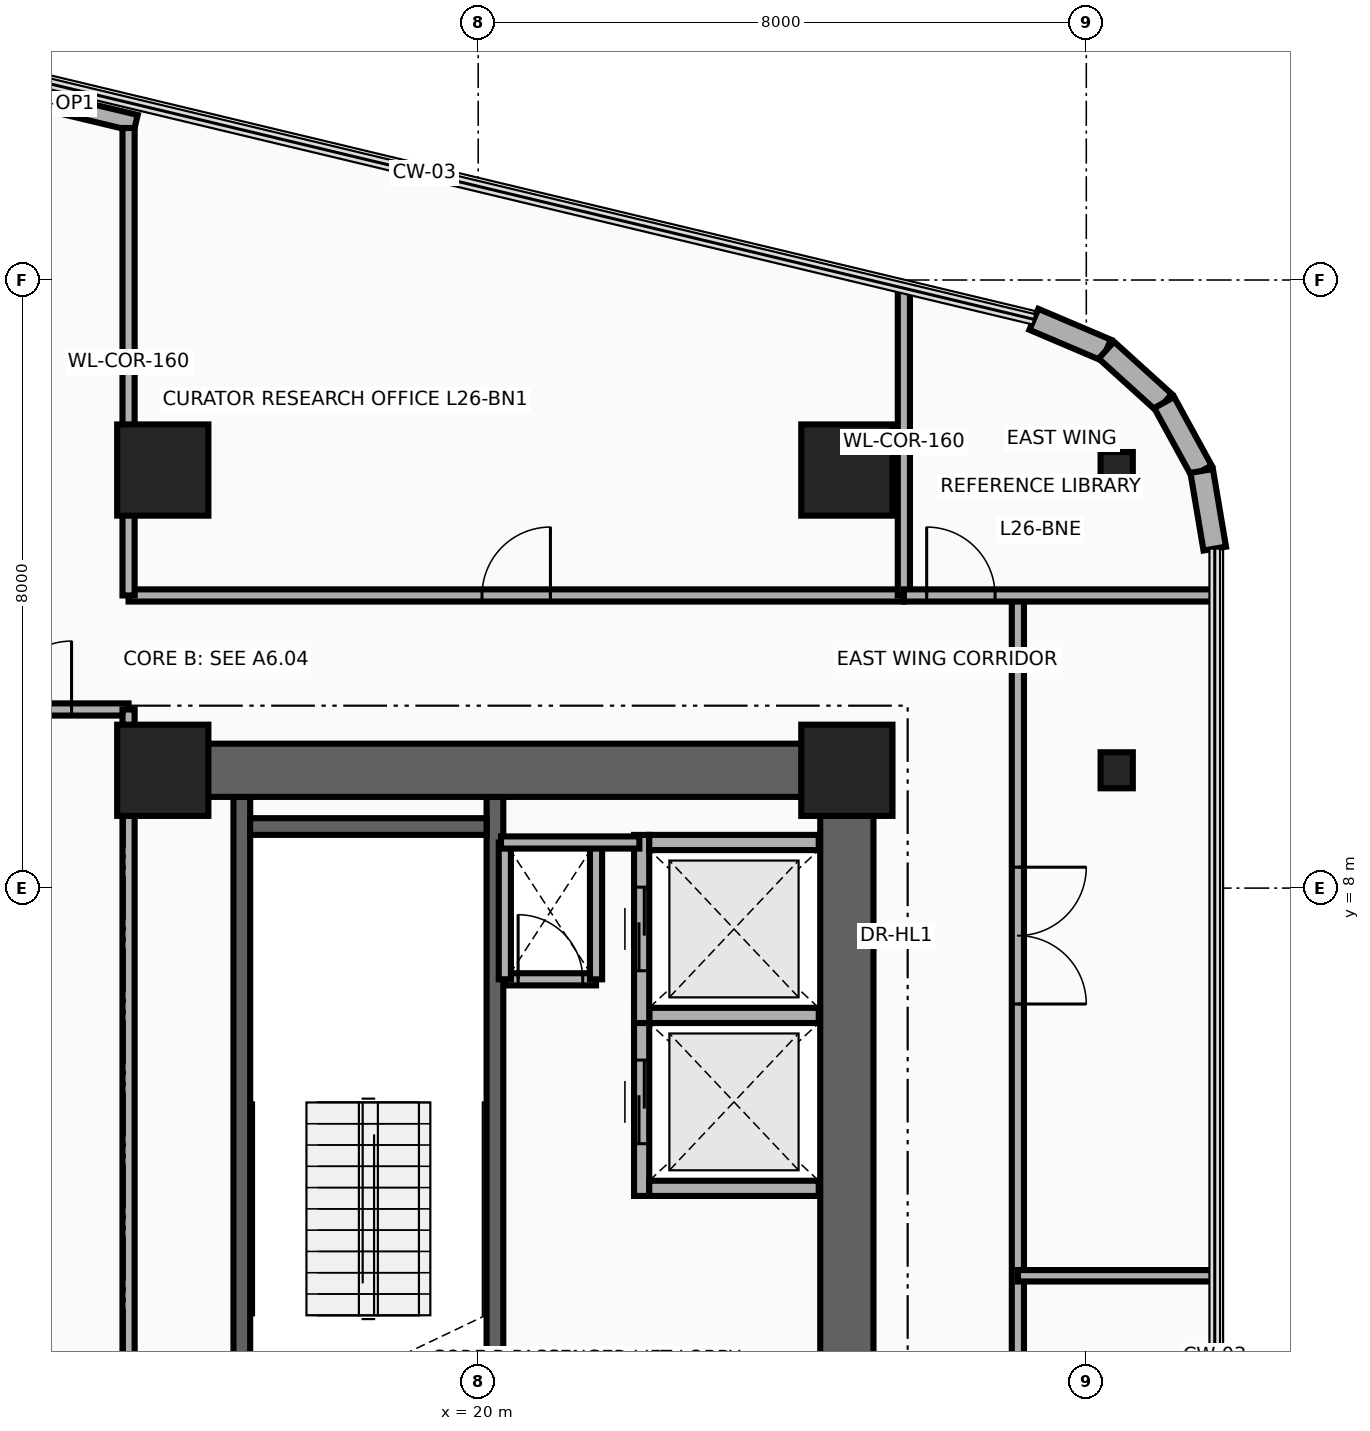
"""IFC4 building model, lengths in metres.
Left out: names, types, materials, properties, quantities, classifications, styles, units other than length and angle.
Written with IfcOpenShell. Run it as: python <this file> out.ifc"""

import sys

from ifc_helpers import new_model, si_unit, direction, frame, frame_2d, origin, origin_2d, place, context, subcontext, project, spatial, rectangle, i_section, extrude, source, transform, mapped, element, fill, save


model = new_model("IFC4")
c1 = context("Model", 3, precision=1e-05, world=origin(), true_north=direction((0.0, 1.0)))
c2 = subcontext(c1, "Body", "Model", "MODEL_VIEW")
j1 = project(units=[si_unit("LENGTHUNIT", "METRE"), si_unit("PLANEANGLEUNIT", "RADIAN")], contexts=[c1])
p1 = place(None, origin())
s1 = spatial("IfcSite", under=j1, at=p1, CompositionType="ELEMENT")
p2 = place(p1, origin())
s2 = spatial("IfcBuilding", under=s1, at=p2, CompositionType="ELEMENT")
p3 = place(p2, frame((0.0, 0.0, 105.7)))
s3 = spatial("IfcBuildingStorey", under=s2, at=p3, CompositionType="ELEMENT", Elevation=105.7)
for number, where, z_axis, x_axis in (
    (1, (16.89, 0.68, 0.0), (0.0, 0.0, 1.0), (0.0, 1.0, 0.0)),
    (2, (20.22, 0.68, 0.0), (0.0, 0.0, 1.0), (0.0, 1.0, 0.0)),
):
    element("IfcWall", number, at=place(p3, frame(where, z_axis=z_axis, x_axis=x_axis)), inside=s3, PredefinedType="SHEAR", context=c2, shape_type="SweptSolid", body=[
        extrude(rectangle(XDim=8.52, YDim=0.22, at=frame_2d((4.26, 0.0))), origin(), (0.0, 0.0, 1.0), 3.46),
    ])
p4 = place(p3, frame((17.0, 8.81, 0.0), z_axis=(0.0, 0.0, 1.0), x_axis=(1.0, 0.0, 0.0)))
e3 = element("IfcWall", 3, at=p4, inside=s3, PredefinedType="SHEAR", context=c2, shape_type="SweptSolid", body=[
    extrude(rectangle(XDim=3.11, YDim=0.22, at=frame_2d((1.555, 0.0))), origin(), (0.0, 0.0, 1.0), 3.46),
])
p5 = place(p3, frame((24.85, 0.95, 0.0), z_axis=(0.0, 0.0, 1.0), x_axis=(0.0, 1.0, 0.0)))
e4 = element("IfcWall", 4, at=p5, inside=s3, PredefinedType="SHEAR", context=c2, shape_type="SweptSolid", body=[
    extrude(rectangle(XDim=8.95, YDim=0.7, at=frame_2d((4.475, 0.0))), origin(), (0.0, 0.0, 1.0), 3.46),
])
p6 = place(p3, frame((15.85, 9.55, 0.0), z_axis=(0.0, 0.0, 1.0), x_axis=(1.0, 0.0, 0.0)))
e5 = element("IfcWall", 5, at=p6, inside=s3, PredefinedType="SHEAR", context=c2, shape_type="SweptSolid", body=[
    extrude(rectangle(XDim=9.0, YDim=0.7, at=frame_2d((4.5, 0.0))), origin(), (0.0, 0.0, 1.0), 3.46),
])
m1 = source(origin(), c2, "Body", "SweptSolid", [
    extrude(rectangle(XDim=1.2, YDim=1.2, at=origin_2d()), origin(), (0.0, 0.0, 1.0), 3.7),
])
for number, where, z_axis, x_axis in (
    (6, (15.85, 9.55, 0.0), (0.0, 0.0, 1.0), (1.0, 0.0, 0.0)),
    (7, (24.85, 9.55, 0.0), (0.0, 0.0, 1.0), (1.0, 0.0, 0.0)),
):
    element("IfcColumn", number, at=place(p3, frame(where, z_axis=z_axis, x_axis=x_axis)), inside=s3, PredefinedType="COLUMN", context=c2, shape_type="MappedRepresentation", body=[
        mapped(m1, transform((0.0, 0.0, 0.0), x_axis=(1.0, 0.0, 0.0), y_axis=(0.0, 1.0, 0.0), z_axis=(0.0, 0.0, 1.0), scale=1.0)),
    ])
m2 = source(origin(), c2, "Body", "SweptSolid", [
    extrude(i_section(OverallWidth=0.424, OverallDepth=0.474, WebThickness=0.048, FlangeThickness=0.077, at=origin_2d()), origin(), (0.0, 0.0, 1.0), 3.7),
])
p7 = place(p3, frame((28.4, 9.55, 0.0), z_axis=(0.0, 0.0, 1.0), x_axis=(1.0, 0.0, 0.0)))
e8 = element("IfcColumn", 8, at=p7, inside=s3, PredefinedType="COLUMN", context=c2, shape_type="MappedRepresentation", body=[
    mapped(m2, transform((0.0, 0.0, 0.0), x_axis=(1.0, 0.0, 0.0), y_axis=(0.0, 1.0, 0.0), z_axis=(0.0, 0.0, 1.0), scale=1.0)),
])
for number, where, z_axis, x_axis in (
    (9, (15.85, 13.5, 0.0), (0.0, 0.0, 1.0), (1.0, 0.0, 0.0)),
    (10, (24.85, 13.5, 0.0), (0.0, 0.0, 1.0), (1.0, 0.0, 0.0)),
):
    element("IfcColumn", number, at=place(p3, frame(where, z_axis=z_axis, x_axis=x_axis)), inside=s3, PredefinedType="COLUMN", context=c2, shape_type="MappedRepresentation", body=[
        mapped(m1, transform((0.0, 0.0, 0.0), x_axis=(1.0, 0.0, 0.0), y_axis=(0.0, 1.0, 0.0), z_axis=(0.0, 0.0, 1.0), scale=1.0)),
    ])
p8 = place(p3, frame((28.4, 13.5, 0.0), z_axis=(0.0, 0.0, 1.0), x_axis=(1.0, 0.0, 0.0)))
e11 = element("IfcColumn", 11, at=p8, inside=s3, PredefinedType="COLUMN", context=c2, shape_type="MappedRepresentation", body=[
    mapped(m2, transform((0.0, 0.0, 0.0), x_axis=(1.0, 0.0, 0.0), y_axis=(0.0, 1.0, 0.0), z_axis=(0.0, 0.0, 1.0), scale=1.0)),
])
p9 = place(p3, frame((13.355, 18.576, 0.0), z_axis=(0.0, 0.0, 1.0), x_axis=(0.97252211384, -0.232810519721, 0.0)))
e12 = element("IfcWall", 12, at=p9, inside=s3, PredefinedType="SOLIDWALL", context=c2, shape_type="SweptSolid", body=[
    extrude(rectangle(XDim=2.2, YDim=0.22, at=frame_2d((1.1, 0.0))), origin(), (0.0, 0.0, 1.0), 3.46),
])
p10 = place(p9, frame((0.65, 0.0, 0.95)))
e13 = element("IfcOpeningElement", 13, at=p10, cuts=e12, PredefinedType="OPENING", context=c2, shape_type="SweptSolid", body=[
    extrude(rectangle(XDim=0.9, YDim=1.3, at=frame_2d((0.45, 0.65))), frame((0.0, 0.125, 0.0), z_axis=(0.0, -1.0, 0.0), x_axis=(1.0, 0.0, 0.0)), (0.0, 0.0, 1.0), 0.25),
])
p11 = place(p3, frame((27.31, 15.483, 0.0), z_axis=(0.0, 0.0, 1.0), x_axis=(0.920250328759, -0.391330208927, 0.0)))
e14 = element("IfcWall", 14, at=p11, inside=s3, PredefinedType="SOLIDWALL", context=c2, shape_type="SweptSolid", body=[
    extrude(rectangle(XDim=1.036, YDim=0.3, at=frame_2d((0.518, 0.0))), origin(), (0.0, 0.0, 1.0), 3.46),
])
p12 = place(p3, frame((28.264, 15.077, 0.0), z_axis=(0.0, 0.0, 1.0), x_axis=(0.741208839713, -0.671274501178, 0.0)))
e15 = element("IfcWall", 15, at=p12, inside=s3, PredefinedType="SOLIDWALL", context=c2, shape_type="SweptSolid", body=[
    extrude(rectangle(XDim=1.026, YDim=0.3, at=frame_2d((0.513, 0.0))), origin(), (0.0, 0.0, 1.0), 3.46),
])
p13 = place(p3, frame((29.025, 14.388, 0.0), z_axis=(0.0, 0.0, 1.0), x_axis=(0.480284137298, -0.87711296163, 0.0)))
e16 = element("IfcWall", 16, at=p13, inside=s3, PredefinedType="SOLIDWALL", context=c2, shape_type="SweptSolid", body=[
    extrude(rectangle(XDim=1.027, YDim=0.3, at=frame_2d((0.513, 0.0))), origin(), (0.0, 0.0, 1.0), 3.46),
])
p14 = place(p3, frame((29.518, 13.488, 0.0), z_axis=(0.0, 0.0, 1.0), x_axis=(0.166156796952, -0.986099345313, 0.0)))
e17 = element("IfcWall", 17, at=p14, inside=s3, PredefinedType="SOLIDWALL", context=c2, shape_type="SweptSolid", body=[
    extrude(rectangle(XDim=1.036, YDim=0.3, at=frame_2d((0.518, 0.0))), origin(), (0.0, 0.0, 1.0), 3.46),
])
p15 = place(p3, frame((22.15, 3.95, 0.0), z_axis=(0.0, 0.0, 1.0), x_axis=(0.0, 1.0, 0.0)))
e18 = element("IfcWall", 18, at=p15, inside=s3, PredefinedType="MOVABLE", context=c2, shape_type="SweptSolid", body=[
    extrude(rectangle(XDim=2.475, YDim=0.2, at=frame_2d((1.238, 0.0))), origin(), (0.0, 0.0, 1.0), 3.46),
])
p16 = place(p15, frame((0.688, 0.0, 0.0)))
e19 = element("IfcOpeningElement", 19, at=p16, cuts=e18, PredefinedType="OPENING", context=c2, shape_type="SweptSolid", body=[
    extrude(rectangle(XDim=1.1, YDim=2.1, at=frame_2d((0.55, 1.05))), frame((0.0, 0.115, 0.0), z_axis=(0.0, -1.0, 0.0), x_axis=(1.0, 0.0, 0.0)), (0.0, 0.0, 1.0), 0.23),
])
for number, where, z_axis, x_axis in (
    (20, (22.25, 4.05, 0.0), (0.0, 0.0, 1.0), (1.0, 0.0, 0.0)),
    (21, (22.25, 6.325, 0.0), (0.0, 0.0, 1.0), (1.0, 0.0, 0.0)),
):
    element("IfcWall", number, at=place(p3, frame(where, z_axis=z_axis, x_axis=x_axis)), inside=s3, PredefinedType="MOVABLE", context=c2, shape_type="SweptSolid", body=[
        extrude(rectangle(XDim=2.23, YDim=0.2, at=frame_2d((1.115, 0.0))), origin(), (0.0, 0.0, 1.0), 2.245),
    ])
p17 = place(p3, frame((22.15, 6.225, 0.0), z_axis=(0.0, 0.0, 1.0), x_axis=(0.0, 1.0, 0.0)))
e22 = element("IfcWall", 22, at=p17, inside=s3, PredefinedType="MOVABLE", context=c2, shape_type="SweptSolid", body=[
    extrude(rectangle(XDim=2.475, YDim=0.2, at=frame_2d((1.237, 0.0))), origin(), (0.0, 0.0, 1.0), 3.46),
])
p18 = place(p17, frame((0.688, 0.0, 0.0)))
e23 = element("IfcOpeningElement", 23, at=p18, cuts=e22, PredefinedType="OPENING", context=c2, shape_type="SweptSolid", body=[
    extrude(rectangle(XDim=1.1, YDim=2.1, at=frame_2d((0.55, 1.05))), frame((0.0, 0.115, 0.0), z_axis=(0.0, -1.0, 0.0), x_axis=(1.0, 0.0, 0.0)), (0.0, 0.0, 1.0), 0.23),
])
p19 = place(p3, frame((22.25, 8.6, 0.0), z_axis=(0.0, 0.0, 1.0), x_axis=(1.0, 0.0, 0.0)))
e24 = element("IfcWall", 24, at=p19, inside=s3, PredefinedType="MOVABLE", context=c2, shape_type="SweptSolid", body=[
    extrude(rectangle(XDim=2.23, YDim=0.2, at=frame_2d((1.115, 0.0))), origin(), (0.0, 0.0, 1.0), 2.245),
])
p20 = place(p3, frame((20.35, 6.8, 0.0), z_axis=(0.0, 0.0, 1.0), x_axis=(1.0, 0.0, 0.0)))
e25 = element("IfcWall", 25, at=p20, inside=s3, PredefinedType="PARTITIONING", context=c2, shape_type="SweptSolid", body=[
    extrude(rectangle(XDim=1.2, YDim=0.16, at=frame_2d((0.6, 0.0))), origin(), (0.0, 0.0, 1.0), 3.46),
])
p21 = place(p20, frame((0.175, 0.0, 0.0)))
e26 = element("IfcOpeningElement", 26, at=p21, cuts=e25, PredefinedType="OPENING", context=c2, shape_type="SweptSolid", body=[
    extrude(rectangle(XDim=0.85, YDim=2.05, at=frame_2d((0.425, 1.025))), frame((0.0, 0.095, 0.0), z_axis=(0.0, -1.0, 0.0), x_axis=(1.0, 0.0, 0.0)), (0.0, 0.0, 1.0), 0.19),
])
for number, where, z_axis, x_axis in (
    (27, (21.55, 6.8, 0.0), (0.0, 0.0, 1.0), (0.0, 1.0, 0.0)),
    (28, (20.35, 6.8, 0.0), (0.0, 0.0, 1.0), (0.0, 1.0, 0.0)),
):
    element("IfcWall", number, at=place(p3, frame(where, z_axis=z_axis, x_axis=x_axis)), inside=s3, PredefinedType="PARTITIONING", context=c2, shape_type="SweptSolid", body=[
        extrude(rectangle(XDim=1.8, YDim=0.16, at=frame_2d((0.9, 0.0))), origin(), (0.0, 0.0, 1.0), 3.46),
    ])
p22 = place(p3, frame((20.3, 8.6, 0.0), z_axis=(0.0, 0.0, 1.0), x_axis=(1.0, 0.0, 0.0)))
e29 = element("IfcWall", 29, at=p22, inside=s3, PredefinedType="PARTITIONING", context=c2, shape_type="SweptSolid", body=[
    extrude(rectangle(XDim=1.82, YDim=0.16, at=frame_2d((0.91, 0.0))), origin(), (0.0, 0.0, 1.0), 3.46),
])
p23 = place(p3, frame((15.4, 11.85, 0.0), z_axis=(0.0, 0.0, 1.0), x_axis=(1.0, 0.0, 0.0)))
e30 = element("IfcWall", 30, at=p23, inside=s3, PredefinedType="PARTITIONING", context=c2, shape_type="SweptSolid", body=[
    extrude(rectangle(XDim=10.2, YDim=0.16, at=frame_2d((5.1, 0.0))), origin(), (0.0, 0.0, 1.0), 2.834),
])
p24 = place(p23, frame((4.65, 0.0, 0.0)))
e31 = element("IfcOpeningElement", 31, at=p24, cuts=e30, PredefinedType="OPENING", context=c2, shape_type="SweptSolid", body=[
    extrude(rectangle(XDim=0.9, YDim=2.1, at=frame_2d((0.45, 1.05))), frame((0.0, 0.095, 0.0), z_axis=(0.0, -1.0, 0.0), x_axis=(1.0, 0.0, 0.0)), (0.0, 0.0, 1.0), 0.19),
])
p25 = place(p3, frame((15.4, 11.85, 0.0), z_axis=(0.0, 0.0, 1.0), x_axis=(0.0, 1.0, 0.0)))
e32 = element("IfcWall", 32, at=p25, inside=s3, PredefinedType="PARTITIONING", context=c2, shape_type="SweptSolid", body=[
    extrude(rectangle(XDim=6.15, YDim=0.16, at=frame_2d((3.075, 0.0))), origin(), (0.0, 0.0, 1.0), 2.666),
])
p26 = place(p3, frame((25.6, 11.85, 0.0), z_axis=(0.0, 0.0, 1.0), x_axis=(0.0, 1.0, 0.0)))
e33 = element("IfcWall", 33, at=p26, inside=s3, PredefinedType="PARTITIONING", context=c2, shape_type="SweptSolid", body=[
    extrude(rectangle(XDim=4.042, YDim=0.16, at=frame_2d((2.021, 0.0))), origin(), (0.0, 0.0, 1.0), 2.666),
])
p27 = place(p3, frame((27.1, -11.661, 0.0), z_axis=(0.0, 0.0, 1.0), x_axis=(0.0, 1.0, 0.0)))
e34 = element("IfcWall", 34, at=p27, inside=s3, PredefinedType="PARTITIONING", context=c2, shape_type="SweptSolid", body=[
    extrude(rectangle(XDim=23.511, YDim=0.16, at=frame_2d((11.755, 0.0))), origin(), (0.0, 0.0, 1.0), 2.666),
])
p28 = place(p27, frame((2.56, 0.0, 0.0)))
e35 = element("IfcOpeningElement", 35, at=p28, cuts=e34, PredefinedType="OPENING", context=c2, shape_type="SweptSolid", body=[
    extrude(rectangle(XDim=0.9, YDim=2.1, at=frame_2d((0.45, 1.05))), frame((0.0, 0.095, 0.0), z_axis=(0.0, -1.0, 0.0), x_axis=(1.0, 0.0, 0.0)), (0.0, 0.0, 1.0), 0.19),
])
p29 = place(p27, frame((9.451, 0.0, 0.0)))
e36 = element("IfcOpeningElement", 36, at=p29, cuts=e34, PredefinedType="OPENING", context=c2, shape_type="SweptSolid", body=[
    extrude(rectangle(XDim=1.8, YDim=2.15, at=frame_2d((0.9, 1.075))), frame((0.0, 0.095, 0.0), z_axis=(0.0, -1.0, 0.0), x_axis=(1.0, 0.0, 0.0)), (0.0, 0.0, 1.0), 0.19),
])
p30 = place(p27, frame((18.136, 0.0, 0.0)))
e37 = element("IfcOpeningElement", 37, at=p30, cuts=e34, PredefinedType="OPENING", context=c2, shape_type="SweptSolid", body=[
    extrude(rectangle(XDim=1.8, YDim=2.15, at=frame_2d((0.9, 1.075))), frame((0.0, 0.095, 0.0), z_axis=(0.0, -1.0, 0.0), x_axis=(1.0, 0.0, 0.0)), (0.0, 0.0, 1.0), 0.19),
])
p31 = place(p3, frame((25.6, 11.85, 0.0), z_axis=(0.0, 0.0, 1.0), x_axis=(1.0, 0.0, 0.0)))
e38 = element("IfcWall", 38, at=p31, inside=s3, PredefinedType="PARTITIONING", context=c2, shape_type="SweptSolid", body=[
    extrude(rectangle(XDim=4.09, YDim=0.16, at=frame_2d((2.045, 0.0))), origin(), (0.0, 0.0, 1.0), 2.896),
])
p32 = place(p31, frame((0.3, 0.0, 0.0)))
e39 = element("IfcOpeningElement", 39, at=p32, cuts=e38, PredefinedType="OPENING", context=c2, shape_type="SweptSolid", body=[
    extrude(rectangle(XDim=0.9, YDim=2.1, at=frame_2d((0.45, 1.05))), frame((0.0, 0.095, 0.0), z_axis=(0.0, -1.0, 0.0), x_axis=(1.0, 0.0, 0.0)), (0.0, 0.0, 1.0), 0.19),
])
p33 = place(p3, frame((27.1, 2.9, 0.0), z_axis=(0.0, 0.0, 1.0), x_axis=(1.0, 0.0, 0.0)))
e40 = element("IfcWall", 40, at=p33, inside=s3, PredefinedType="PARTITIONING", context=c2, shape_type="SweptSolid", body=[
    extrude(rectangle(XDim=2.59, YDim=0.15, at=frame_2d((1.295, 0.0))), origin(), (0.0, 0.0, 1.0), 2.896),
])
p34 = place(p3, frame((13.3, 10.35, 0.0), z_axis=(0.0, 0.0, 1.0), x_axis=(1.0, 0.0, 0.0)))
e41 = element("IfcWall", 41, at=p34, inside=s3, PredefinedType="PARTITIONING", context=c2, shape_type="SweptSolid", body=[
    extrude(rectangle(XDim=2.1, YDim=0.16, at=frame_2d((1.05, 0.0))), origin(), (0.0, 0.0, 1.0), 2.666),
])
p35 = place(p34, frame((0.45, 0.0, 0.0)))
e42 = element("IfcOpeningElement", 42, at=p35, cuts=e41, PredefinedType="OPENING", context=c2, shape_type="SweptSolid", body=[
    extrude(rectangle(XDim=0.9, YDim=2.1, at=frame_2d((0.45, 1.05))), frame((0.0, 0.095, 0.0), z_axis=(0.0, -1.0, 0.0), x_axis=(1.0, 0.0, 0.0)), (0.0, 0.0, 1.0), 0.19),
])
p36 = place(p3, frame((15.4, 1.0, 0.0), z_axis=(0.0, 0.0, 1.0), x_axis=(0.0, 1.0, 0.0)))
e43 = element("IfcWall", 43, at=p36, inside=s3, PredefinedType="PARTITIONING", context=c2, shape_type="SweptSolid", body=[
    extrude(rectangle(XDim=9.35, YDim=0.16, at=frame_2d((4.675, 0.0))), origin(), (0.0, 0.0, 1.0), 2.245),
])
p37 = place(p10, origin())
e44 = element("IfcWindow", 44, at=p37, inside=s3, PartitioningType="SINGLE_PANEL", PredefinedType="WINDOW", context=c2, shape_type="SweptSolid", body=[
    extrude(rectangle(XDim=0.9, YDim=1.3, at=frame_2d((0.45, 0.65))), frame((0.0, 0.03, 0.0), z_axis=(0.0, -1.0, 0.0), x_axis=(1.0, 0.0, 0.0)), (0.0, 0.0, 1.0), 0.06),
])
fill(e13, e44)
p38 = place(p16, origin())
e45 = element("IfcDoor", 45, at=p38, inside=s3, OperationType="DOUBLE_DOOR_SLIDING", PredefinedType="DOOR", context=c2, shape_type="SweptSolid", body=[
    extrude(rectangle(XDim=1.1, YDim=2.1, at=frame_2d((0.55, 1.05))), frame((0.0, 0.025, 0.0), z_axis=(0.0, -1.0, 0.0), x_axis=(1.0, 0.0, 0.0)), (0.0, 0.0, 1.0), 0.05),
])
fill(e19, e45)
p39 = place(p18, origin())
e46 = element("IfcDoor", 46, at=p39, inside=s3, OperationType="DOUBLE_DOOR_SLIDING", PredefinedType="DOOR", context=c2, shape_type="SweptSolid", body=[
    extrude(rectangle(XDim=1.1, YDim=2.1, at=frame_2d((0.55, 1.05))), frame((0.0, 0.025, 0.0), z_axis=(0.0, -1.0, 0.0), x_axis=(1.0, 0.0, 0.0)), (0.0, 0.0, 1.0), 0.05),
])
fill(e23, e46)
p40 = place(p21, origin())
e47 = element("IfcDoor", 47, at=p40, inside=s3, OperationType="SINGLE_SWING_LEFT", PredefinedType="DOOR", context=c2, shape_type="SweptSolid", body=[
    extrude(rectangle(XDim=0.85, YDim=2.05, at=frame_2d((0.425, 1.025))), frame((0.0, 0.025, 0.0), z_axis=(0.0, -1.0, 0.0), x_axis=(1.0, 0.0, 0.0)), (0.0, 0.0, 1.0), 0.05),
])
fill(e26, e47)
p41 = place(p24, origin())
e48 = element("IfcDoor", 48, at=p41, inside=s3, OperationType="SINGLE_SWING_RIGHT", PredefinedType="DOOR", context=c2, shape_type="SweptSolid", body=[
    extrude(rectangle(XDim=0.9, YDim=2.1, at=frame_2d((0.45, 1.05))), frame((0.0, 0.025, 0.0), z_axis=(0.0, -1.0, 0.0), x_axis=(1.0, 0.0, 0.0)), (0.0, 0.0, 1.0), 0.05),
])
fill(e31, e48)
p42 = place(p32, origin())
e49 = element("IfcDoor", 49, at=p42, inside=s3, OperationType="SINGLE_SWING_RIGHT", PredefinedType="DOOR", context=c2, shape_type="SweptSolid", body=[
    extrude(rectangle(XDim=0.9, YDim=2.1, at=frame_2d((0.45, 1.05))), frame((0.0, 0.025, 0.0), z_axis=(0.0, -1.0, 0.0), x_axis=(1.0, 0.0, 0.0)), (0.0, 0.0, 1.0), 0.05),
])
fill(e39, e49)
p43 = place(p30, frame((1.8, 0.0, 0.0), z_axis=(0.0, 0.0, 1.0), x_axis=(-1.0, 0.0, 0.0)))
e50 = element("IfcDoor", 50, at=p43, inside=s3, OperationType="DOUBLE_DOOR_SINGLE_SWING", PredefinedType="DOOR", context=c2, shape_type="SweptSolid", body=[
    extrude(rectangle(XDim=1.8, YDim=2.15, at=frame_2d((0.9, 1.075))), frame((0.0, 0.025, 0.0), z_axis=(0.0, -1.0, 0.0), x_axis=(1.0, 0.0, 0.0)), (0.0, 0.0, 1.0), 0.05),
])
fill(e37, e50)
p44 = place(p35, origin())
e51 = element("IfcDoor", 51, at=p44, inside=s3, OperationType="SINGLE_SWING_RIGHT", PredefinedType="DOOR", context=c2, shape_type="SweptSolid", body=[
    extrude(rectangle(XDim=0.9, YDim=2.1, at=frame_2d((0.45, 1.05))), frame((0.0, 0.025, 0.0), z_axis=(0.0, -1.0, 0.0), x_axis=(1.0, 0.0, 0.0)), (0.0, 0.0, 1.0), 0.05),
])
fill(e42, e51)
save(model, sys.argv[1])
